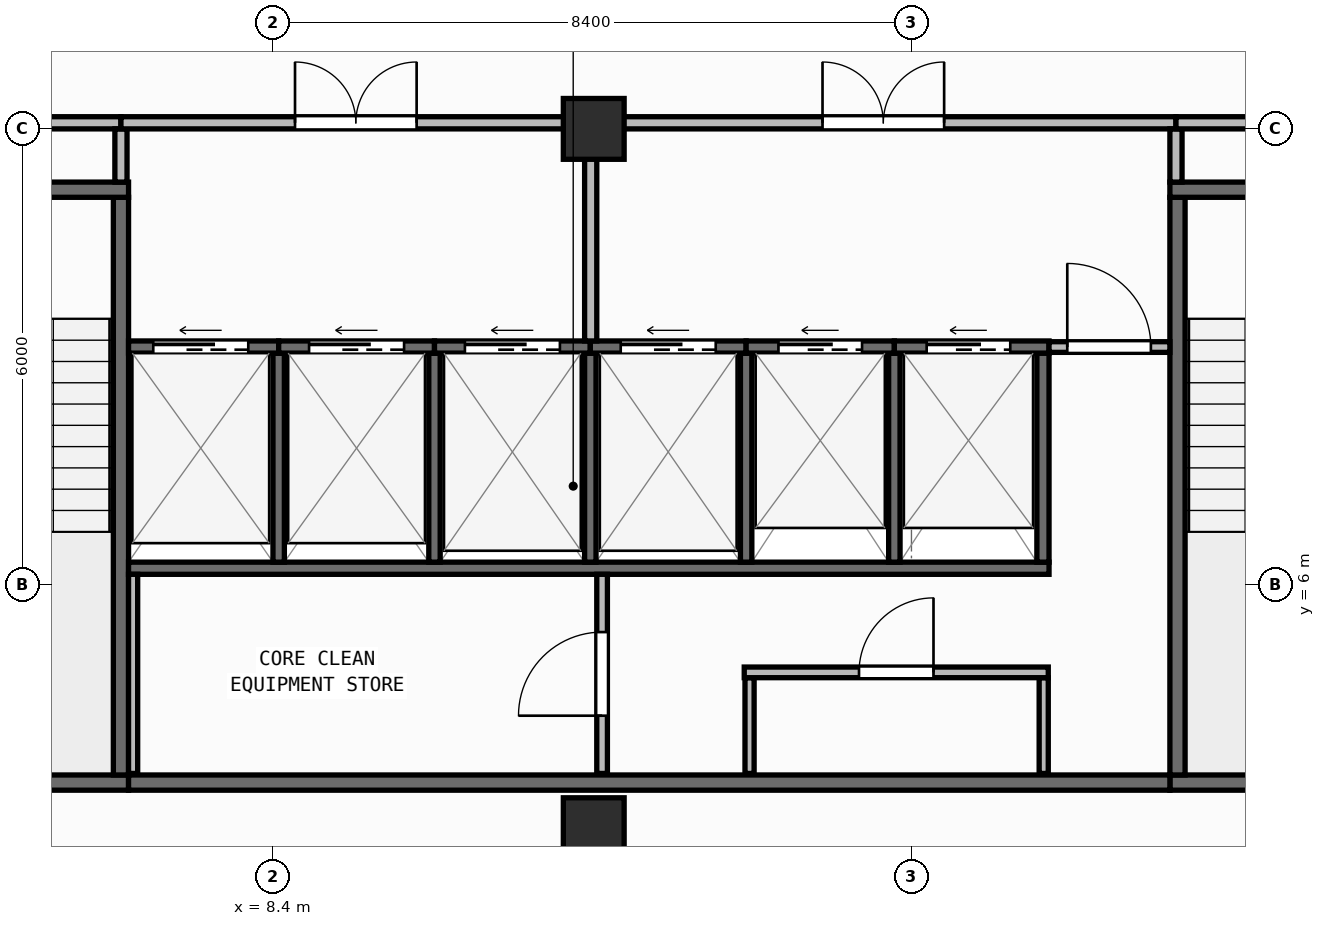
"""IFC4 building model, lengths in metres.
Left out: names, types, materials, properties, quantities, classifications, styles, units other than length and angle.
Written with IfcOpenShell. Run it as: python <this file> out.ifc"""

import sys

from ifc_helpers import new_model, si_unit, direction, frame, frame_2d, origin, origin_2d, place, context, subcontext, project, spatial, rectangle, extrude, element, fill, save


model = new_model("IFC4")
c1 = context("Model", 3, precision=1e-05, world=origin(), true_north=direction((0.0, 1.0)))
c2 = subcontext(c1, "Body", "Model", "MODEL_VIEW")
j1 = project(units=[si_unit("LENGTHUNIT", "METRE"), si_unit("PLANEANGLEUNIT", "RADIAN")], contexts=[c1])
p1 = place(None, origin())
s1 = spatial("IfcSite", under=j1, at=p1, CompositionType="ELEMENT")
p2 = place(p1, origin())
s2 = spatial("IfcBuilding", under=s1, at=p2, CompositionType="ELEMENT")
p3 = place(p2, frame((0.0, 0.0, 300.0)))
s3 = spatial("IfcBuildingStorey", under=s2, at=p3, CompositionType="ELEMENT", Elevation=300.0)
for number, where, z_axis, x_axis in (
    (1, (12.62, 2.8, 0.0), (0.0, 0.0, 1.0), (1.0, 0.0, 0.0)),
    (2, (12.62, 12.0, 0.0), (0.0, 0.0, 1.0), (1.0, 0.0, 0.0)),
):
    element("IfcColumn", number, at=place(p3, frame(where, z_axis=z_axis, x_axis=x_axis)), inside=s3, PredefinedType="COLUMN", context=c2, shape_type="SweptSolid", body=[
        extrude(rectangle(XDim=0.8, YDim=0.8, at=origin_2d()), origin(), (0.0, 0.0, 1.0), 3.95),
    ])
p4 = place(p3, frame((2.46, 0.171, 0.0), z_axis=(0.0, 0.0, 1.0), x_axis=(0.997760665813, 0.066885377746, 0.0)))
e3 = element("IfcWall", 3, at=p4, inside=s3, PredefinedType="STANDARD", context=c2, shape_type="SweptSolid", body=[
    extrude(rectangle(XDim=35.56, YDim=0.26, at=frame_2d((17.78, 0.0))), origin(), (0.0, 0.0, 1.0), 3.67),
])
p5 = place(p4, frame((16.58, 0.0, 0.9)))
e4 = element("IfcOpeningElement", 4, at=p5, cuts=e3, PredefinedType="OPENING", context=c2, shape_type="SweptSolid", body=[
    extrude(rectangle(XDim=2.4, YDim=1.65, at=frame_2d((1.2, 0.825))), frame((0.0, 0.14, 0.0), z_axis=(0.0, -1.0, 0.0), x_axis=(1.0, 0.0, 0.0)), (0.0, 0.0, 1.0), 0.28),
])
p6 = place(p3, frame((2.8, 3.4, 0.0), z_axis=(0.0, 0.0, 1.0), x_axis=(1.0, 0.0, 0.0)))
e5 = element("IfcWall", 5, at=p6, inside=s3, PredefinedType="SHEAR", context=c2, shape_type="SweptSolid", body=[
    extrude(rectangle(XDim=3.7, YDim=0.2, at=frame_2d((1.85, 0.0))), origin(), (0.0, 0.0, 1.0), 3.67),
])
p7 = place(p3, frame((6.4, 3.5, 0.0), z_axis=(0.0, 0.0, 1.0), x_axis=(0.0, 1.0, 0.0)))
e6 = element("IfcWall", 6, at=p7, inside=s3, PredefinedType="SHEAR", context=c2, shape_type="SweptSolid", body=[
    extrude(rectangle(XDim=7.6, YDim=0.2, at=frame_2d((3.8, 0.0))), origin(), (0.0, 0.0, 1.0), 3.67),
])
p8 = place(p3, frame((2.8, 11.2, 0.0), z_axis=(0.0, 0.0, 1.0), x_axis=(1.0, 0.0, 0.0)))
e7 = element("IfcWall", 7, at=p8, inside=s3, PredefinedType="SHEAR", context=c2, shape_type="SweptSolid", body=[
    extrude(rectangle(XDim=3.7, YDim=0.2, at=frame_2d((1.85, 0.0))), origin(), (0.0, 0.0, 1.0), 3.67),
])
p9 = place(p8, frame((1.2, 0.0, 0.0)))
e8 = element("IfcOpeningElement", 8, at=p9, cuts=e7, PredefinedType="OPENING", context=c2, shape_type="SweptSolid", body=[
    extrude(rectangle(XDim=1.3, YDim=2.15, at=frame_2d((0.65, 1.075))), frame((0.0, 0.11, 0.0), z_axis=(0.0, -1.0, 0.0), x_axis=(1.0, 0.0, 0.0)), (0.0, 0.0, 1.0), 0.22),
])
p10 = place(p3, frame((20.2, 3.4, 0.0), z_axis=(0.0, 0.0, 1.0), x_axis=(1.0, 0.0, 0.0)))
e9 = element("IfcWall", 9, at=p10, inside=s3, PredefinedType="SHEAR", context=c2, shape_type="SweptSolid", body=[
    extrude(rectangle(XDim=3.7, YDim=0.2, at=frame_2d((1.85, 0.0))), origin(), (0.0, 0.0, 1.0), 3.67),
])
p11 = place(p3, frame((20.3, 3.5, 0.0), z_axis=(0.0, 0.0, 1.0), x_axis=(0.0, 1.0, 0.0)))
e10 = element("IfcWall", 10, at=p11, inside=s3, PredefinedType="SHEAR", context=c2, shape_type="SweptSolid", body=[
    extrude(rectangle(XDim=7.6, YDim=0.2, at=frame_2d((3.8, 0.0))), origin(), (0.0, 0.0, 1.0), 3.67),
])
p12 = place(p3, frame((20.2, 11.2, 0.0), z_axis=(0.0, 0.0, 1.0), x_axis=(1.0, 0.0, 0.0)))
e11 = element("IfcWall", 11, at=p12, inside=s3, PredefinedType="SHEAR", context=c2, shape_type="SweptSolid", body=[
    extrude(rectangle(XDim=3.7, YDim=0.2, at=frame_2d((1.85, 0.0))), origin(), (0.0, 0.0, 1.0), 3.67),
])
p13 = place(p12, frame((1.2, 0.0, 0.0)))
e12 = element("IfcOpeningElement", 12, at=p13, cuts=e11, PredefinedType="OPENING", context=c2, shape_type="SweptSolid", body=[
    extrude(rectangle(XDim=1.3, YDim=2.15, at=frame_2d((0.65, 1.075))), frame((0.0, 0.11, 0.0), z_axis=(0.0, -1.0, 0.0), x_axis=(1.0, 0.0, 0.0)), (0.0, 0.0, 1.0), 0.22),
])
p14 = place(p3, frame((6.5, 3.4, 0.0), z_axis=(0.0, 0.0, 1.0), x_axis=(1.0, 0.0, 0.0)))
e13 = element("IfcWall", 13, at=p14, inside=s3, PredefinedType="SHEAR", context=c2, shape_type="SweptSolid", body=[
    extrude(rectangle(XDim=13.7, YDim=0.2, at=frame_2d((6.85, 0.0))), origin(), (0.0, 0.0, 1.0), 3.67),
])
p15 = place(p3, frame((6.5, 6.22, 0.0), z_axis=(0.0, 0.0, 1.0), x_axis=(1.0, 0.0, 0.0)))
e14 = element("IfcWall", 14, at=p15, inside=s3, PredefinedType="SHEAR", context=c2, shape_type="SweptSolid", body=[
    extrude(rectangle(XDim=12.11, YDim=0.16, at=frame_2d((6.055, 0.0))), origin(), (0.0, 0.0, 1.0), 3.67),
])
p16 = place(p3, frame((18.53, 6.3, 0.0), z_axis=(0.0, 0.0, 1.0), x_axis=(0.0, 1.0, 0.0)))
e15 = element("IfcWall", 15, at=p16, inside=s3, PredefinedType="SHEAR", context=c2, shape_type="SweptSolid", body=[
    extrude(rectangle(XDim=2.75, YDim=0.16, at=frame_2d((1.375, 0.0))), origin(), (0.0, 0.0, 1.0), 3.67),
])
for number, where, z_axis, x_axis in (
    (16, (8.475, 6.3, 0.0), (0.0, 0.0, 1.0), (0.0, 1.0, 0.0)),
    (17, (10.525, 6.3, 0.0), (0.0, 0.0, 1.0), (0.0, 1.0, 0.0)),
    (18, (12.575, 6.3, 0.0), (0.0, 0.0, 1.0), (0.0, 1.0, 0.0)),
    (19, (14.625, 6.3, 0.0), (0.0, 0.0, 1.0), (0.0, 1.0, 0.0)),
    (20, (16.575, 6.3, 0.0), (0.0, 0.0, 1.0), (0.0, 1.0, 0.0)),
):
    element("IfcWall", number, at=place(p3, frame(where, z_axis=z_axis, x_axis=x_axis)), inside=s3, PredefinedType="SHEAR", context=c2, shape_type="SweptSolid", body=[
        extrude(rectangle(XDim=2.75, YDim=0.15, at=frame_2d((1.375, 0.0))), origin(), (0.0, 0.0, 1.0), 3.67),
    ])
p17 = place(p3, frame((6.5, 9.13, 0.0), z_axis=(0.0, 0.0, 1.0), x_axis=(1.0, 0.0, 0.0)))
e21 = element("IfcWall", 21, at=p17, inside=s3, PredefinedType="SHEAR", context=c2, shape_type="SweptSolid", body=[
    extrude(rectangle(XDim=1.975, YDim=0.16, at=frame_2d((0.988, 0.0))), origin(), (0.0, 0.0, 1.0), 3.67),
])
p18 = place(p17, frame((0.325, 0.0, 0.0)))
e22 = element("IfcOpeningElement", 22, at=p18, cuts=e21, PredefinedType="OPENING", context=c2, shape_type="SweptSolid", body=[
    extrude(rectangle(XDim=1.25, YDim=2.15, at=frame_2d((0.625, 1.075))), frame((0.0, 0.09, 0.0), z_axis=(0.0, -1.0, 0.0), x_axis=(1.0, 0.0, 0.0)), (0.0, 0.0, 1.0), 0.18),
])
p19 = place(p3, frame((8.475, 9.13, 0.0), z_axis=(0.0, 0.0, 1.0), x_axis=(1.0, 0.0, 0.0)))
e23 = element("IfcWall", 23, at=p19, inside=s3, PredefinedType="SHEAR", context=c2, shape_type="SweptSolid", body=[
    extrude(rectangle(XDim=2.05, YDim=0.16, at=frame_2d((1.025, 0.0))), origin(), (0.0, 0.0, 1.0), 3.67),
])
p20 = place(p19, frame((0.4, 0.0, 0.0)))
e24 = element("IfcOpeningElement", 24, at=p20, cuts=e23, PredefinedType="OPENING", context=c2, shape_type="SweptSolid", body=[
    extrude(rectangle(XDim=1.25, YDim=2.15, at=frame_2d((0.625, 1.075))), frame((0.0, 0.09, 0.0), z_axis=(0.0, -1.0, 0.0), x_axis=(1.0, 0.0, 0.0)), (0.0, 0.0, 1.0), 0.18),
])
p21 = place(p3, frame((10.525, 9.13, 0.0), z_axis=(0.0, 0.0, 1.0), x_axis=(1.0, 0.0, 0.0)))
e25 = element("IfcWall", 25, at=p21, inside=s3, PredefinedType="SHEAR", context=c2, shape_type="SweptSolid", body=[
    extrude(rectangle(XDim=2.05, YDim=0.16, at=frame_2d((1.025, 0.0))), origin(), (0.0, 0.0, 1.0), 3.67),
])
p22 = place(p21, frame((0.4, 0.0, 0.0)))
e26 = element("IfcOpeningElement", 26, at=p22, cuts=e25, PredefinedType="OPENING", context=c2, shape_type="SweptSolid", body=[
    extrude(rectangle(XDim=1.25, YDim=2.15, at=frame_2d((0.625, 1.075))), frame((0.0, 0.09, 0.0), z_axis=(0.0, -1.0, 0.0), x_axis=(1.0, 0.0, 0.0)), (0.0, 0.0, 1.0), 0.18),
])
p23 = place(p3, frame((12.575, 9.13, 0.0), z_axis=(0.0, 0.0, 1.0), x_axis=(1.0, 0.0, 0.0)))
e27 = element("IfcWall", 27, at=p23, inside=s3, PredefinedType="SHEAR", context=c2, shape_type="SweptSolid", body=[
    extrude(rectangle(XDim=2.05, YDim=0.16, at=frame_2d((1.025, 0.0))), origin(), (0.0, 0.0, 1.0), 3.67),
])
p24 = place(p23, frame((0.4, 0.0, 0.0)))
e28 = element("IfcOpeningElement", 28, at=p24, cuts=e27, PredefinedType="OPENING", context=c2, shape_type="SweptSolid", body=[
    extrude(rectangle(XDim=1.25, YDim=2.15, at=frame_2d((0.625, 1.075))), frame((0.0, 0.09, 0.0), z_axis=(0.0, -1.0, 0.0), x_axis=(1.0, 0.0, 0.0)), (0.0, 0.0, 1.0), 0.18),
])
p25 = place(p3, frame((14.625, 9.13, 0.0), z_axis=(0.0, 0.0, 1.0), x_axis=(1.0, 0.0, 0.0)))
e29 = element("IfcWall", 29, at=p25, inside=s3, PredefinedType="SHEAR", context=c2, shape_type="SweptSolid", body=[
    extrude(rectangle(XDim=1.95, YDim=0.16, at=frame_2d((0.975, 0.0))), origin(), (0.0, 0.0, 1.0), 3.67),
])
p26 = place(p25, frame((0.425, 0.0, 0.0)))
e30 = element("IfcOpeningElement", 30, at=p26, cuts=e29, PredefinedType="OPENING", context=c2, shape_type="SweptSolid", body=[
    extrude(rectangle(XDim=1.1, YDim=2.15, at=frame_2d((0.55, 1.075))), frame((0.0, 0.09, 0.0), z_axis=(0.0, -1.0, 0.0), x_axis=(1.0, 0.0, 0.0)), (0.0, 0.0, 1.0), 0.18),
])
p27 = place(p3, frame((16.575, 9.13, 0.0), z_axis=(0.0, 0.0, 1.0), x_axis=(1.0, 0.0, 0.0)))
e31 = element("IfcWall", 31, at=p27, inside=s3, PredefinedType="SHEAR", context=c2, shape_type="SweptSolid", body=[
    extrude(rectangle(XDim=2.035, YDim=0.16, at=frame_2d((1.018, 0.0))), origin(), (0.0, 0.0, 1.0), 3.67),
])
p28 = place(p27, frame((0.425, 0.0, 0.0)))
e32 = element("IfcOpeningElement", 32, at=p28, cuts=e31, PredefinedType="OPENING", context=c2, shape_type="SweptSolid", body=[
    extrude(rectangle(XDim=1.1, YDim=2.15, at=frame_2d((0.55, 1.075))), frame((0.0, 0.09, 0.0), z_axis=(0.0, -1.0, 0.0), x_axis=(1.0, 0.0, 0.0)), (0.0, 0.0, 1.0), 0.18),
])
p29 = place(p3, frame((6.56, 3.52, 0.0), z_axis=(0.0, 0.0, 1.0), x_axis=(0.0, 1.0, 0.0)))
e33 = element("IfcWall", 33, at=p29, inside=s3, PredefinedType="PARTITIONING", context=c2, shape_type="SweptSolid", body=[
    extrude(rectangle(XDim=2.62, YDim=0.12, at=frame_2d((1.31, 0.0))), origin(), (0.0, 0.0, 1.0), 3.67),
])
p30 = place(p3, frame((12.73, 3.52, 0.0), z_axis=(0.0, 0.0, 1.0), x_axis=(0.0, 1.0, 0.0)))
e34 = element("IfcWall", 34, at=p30, inside=s3, PredefinedType="PARTITIONING", context=c2, shape_type="SweptSolid", body=[
    extrude(rectangle(XDim=2.62, YDim=0.14, at=frame_2d((1.31, 0.0))), origin(), (0.0, 0.0, 1.0), 3.67),
])
p31 = place(p30, frame((0.76, 0.0, 0.0)))
e35 = element("IfcOpeningElement", 35, at=p31, cuts=e34, PredefinedType="OPENING", context=c2, shape_type="SweptSolid", body=[
    extrude(rectangle(XDim=1.1, YDim=2.1, at=frame_2d((0.55, 1.05))), frame((0.0, 0.08, 0.0), z_axis=(0.0, -1.0, 0.0), x_axis=(1.0, 0.0, 0.0)), (0.0, 0.0, 1.0), 0.16),
])
for number, where, z_axis, x_axis in (
    (36, (14.67, 3.52, 0.0), (0.0, 0.0, 1.0), (0.0, 1.0, 0.0)),
    (37, (18.54, 3.52, 0.0), (0.0, 0.0, 1.0), (0.0, 1.0, 0.0)),
):
    element("IfcWall", number, at=place(p3, frame(where, z_axis=z_axis, x_axis=x_axis)), inside=s3, PredefinedType="PARTITIONING", context=c2, shape_type="SweptSolid", body=[
        extrude(rectangle(XDim=1.26, YDim=0.12, at=frame_2d((0.63, 0.0))), origin(), (0.0, 0.0, 1.0), 3.67),
    ])
p32 = place(p3, frame((14.6, 4.85, 0.0), z_axis=(0.0, 0.0, 1.0), x_axis=(1.0, 0.0, 0.0)))
e38 = element("IfcWall", 38, at=p32, inside=s3, PredefinedType="PARTITIONING", context=c2, shape_type="SweptSolid", body=[
    extrude(rectangle(XDim=4.0, YDim=0.14, at=frame_2d((2.0, 0.0))), origin(), (0.0, 0.0, 1.0), 3.67),
])
p33 = place(p32, frame((1.51, 0.0, 0.0)))
e39 = element("IfcOpeningElement", 39, at=p33, cuts=e38, PredefinedType="OPENING", context=c2, shape_type="SweptSolid", body=[
    extrude(rectangle(XDim=0.98, YDim=2.1, at=frame_2d((0.49, 1.05))), frame((0.0, 0.08, 0.0), z_axis=(0.0, -1.0, 0.0), x_axis=(1.0, 0.0, 0.0)), (0.0, 0.0, 1.0), 0.16),
])
p34 = place(p3, frame((18.61, 9.13, 0.0), z_axis=(0.0, 0.0, 1.0), x_axis=(1.0, 0.0, 0.0)))
e40 = element("IfcWall", 40, at=p34, inside=s3, PredefinedType="PARTITIONING", context=c2, shape_type="SweptSolid", body=[
    extrude(rectangle(XDim=1.59, YDim=0.14, at=frame_2d((0.795, 0.0))), origin(), (0.0, 0.0, 1.0), 3.67),
])
p35 = place(p34, frame((0.24, 0.0, 0.0)))
e41 = element("IfcOpeningElement", 41, at=p35, cuts=e40, PredefinedType="OPENING", context=c2, shape_type="SweptSolid", body=[
    extrude(rectangle(XDim=1.1, YDim=2.1, at=frame_2d((0.55, 1.05))), frame((0.0, 0.08, 0.0), z_axis=(0.0, -1.0, 0.0), x_axis=(1.0, 0.0, 0.0)), (0.0, 0.0, 1.0), 0.16),
])
p36 = place(p3, frame((2.8, 12.08, 0.0), z_axis=(0.0, 0.0, 1.0), x_axis=(1.0, 0.0, 0.0)))
e42 = element("IfcWall", 42, at=p36, inside=s3, PredefinedType="PARTITIONING", context=c2, shape_type="SweptSolid", body=[
    extrude(rectangle(XDim=3.6, YDim=0.16, at=frame_2d((1.8, 0.0))), origin(), (0.0, 0.0, 1.0), 3.117),
])
p37 = place(p36, frame((1.0, 0.0, 0.0)))
e43 = element("IfcOpeningElement", 43, at=p37, cuts=e42, PredefinedType="OPENING", context=c2, shape_type="SweptSolid", body=[
    extrude(rectangle(XDim=1.6, YDim=2.05, at=frame_2d((0.8, 1.025))), frame((0.0, 0.09, 0.0), z_axis=(0.0, -1.0, 0.0), x_axis=(1.0, 0.0, 0.0)), (0.0, 0.0, 1.0), 0.18),
])
p38 = place(p3, frame((6.4, 11.3, 0.0), z_axis=(0.0, 0.0, 1.0), x_axis=(0.0, 1.0, 0.0)))
e44 = element("IfcWall", 44, at=p38, inside=s3, PredefinedType="PARTITIONING", context=c2, shape_type="SweptSolid", body=[
    extrude(rectangle(XDim=0.7, YDim=0.16, at=frame_2d((0.35, 0.0))), origin(), (0.0, 0.0, 1.0), 3.67),
])
p39 = place(p3, frame((6.4, 12.08, 0.0), z_axis=(0.0, 0.0, 1.0), x_axis=(1.0, 0.0, 0.0)))
e45 = element("IfcWall", 45, at=p39, inside=s3, PredefinedType="PARTITIONING", context=c2, shape_type="SweptSolid", body=[
    extrude(rectangle(XDim=6.18, YDim=0.16, at=frame_2d((3.09, 0.0))), origin(), (0.0, 0.0, 1.0), 3.117),
])
p40 = place(p39, frame((2.29, 0.0, 0.0)))
e46 = element("IfcOpeningElement", 46, at=p40, cuts=e45, PredefinedType="OPENING", context=c2, shape_type="SweptSolid", body=[
    extrude(rectangle(XDim=1.6, YDim=2.05, at=frame_2d((0.8, 1.025))), frame((0.0, 0.09, 0.0), z_axis=(0.0, -1.0, 0.0), x_axis=(1.0, 0.0, 0.0)), (0.0, 0.0, 1.0), 0.18),
])
p41 = place(p3, frame((12.58, 9.21, 0.0), z_axis=(0.0, 0.0, 1.0), x_axis=(0.0, 1.0, 0.0)))
e47 = element("IfcWall", 47, at=p41, inside=s3, PredefinedType="PARTITIONING", context=c2, shape_type="SweptSolid", body=[
    extrude(rectangle(XDim=2.79, YDim=0.16, at=frame_2d((1.395, 0.0))), origin(), (0.0, 0.0, 1.0), 3.67),
])
p42 = place(p3, frame((12.58, 12.08, 0.0), z_axis=(0.0, 0.0, 1.0), x_axis=(1.0, 0.0, 0.0)))
e48 = element("IfcWall", 48, at=p42, inside=s3, PredefinedType="PARTITIONING", context=c2, shape_type="SweptSolid", body=[
    extrude(rectangle(XDim=7.7, YDim=0.16, at=frame_2d((3.85, 0.0))), origin(), (0.0, 0.0, 1.0), 3.117),
])
p43 = place(p42, frame((3.05, 0.0, 0.0)))
e49 = element("IfcOpeningElement", 49, at=p43, cuts=e48, PredefinedType="OPENING", context=c2, shape_type="SweptSolid", body=[
    extrude(rectangle(XDim=1.6, YDim=2.05, at=frame_2d((0.8, 1.025))), frame((0.0, 0.09, 0.0), z_axis=(0.0, -1.0, 0.0), x_axis=(1.0, 0.0, 0.0)), (0.0, 0.0, 1.0), 0.18),
])
p44 = place(p3, frame((20.28, 11.3, 0.0), z_axis=(0.0, 0.0, 1.0), x_axis=(0.0, 1.0, 0.0)))
e50 = element("IfcWall", 50, at=p44, inside=s3, PredefinedType="PARTITIONING", context=c2, shape_type="SweptSolid", body=[
    extrude(rectangle(XDim=0.7, YDim=0.16, at=frame_2d((0.35, 0.0))), origin(), (0.0, 0.0, 1.0), 3.67),
])
p45 = place(p3, frame((20.28, 12.08, 0.0), z_axis=(0.0, 0.0, 1.0), x_axis=(1.0, 0.0, 0.0)))
e51 = element("IfcWall", 51, at=p45, inside=s3, PredefinedType="PARTITIONING", context=c2, shape_type="SweptSolid", body=[
    extrude(rectangle(XDim=3.62, YDim=0.16, at=frame_2d((1.81, 0.0))), origin(), (0.0, 0.0, 1.0), 3.117),
])
p46 = place(p45, frame((1.01, 0.0, 0.0)))
e52 = element("IfcOpeningElement", 52, at=p46, cuts=e51, PredefinedType="OPENING", context=c2, shape_type="SweptSolid", body=[
    extrude(rectangle(XDim=1.6, YDim=2.05, at=frame_2d((0.8, 1.025))), frame((0.0, 0.09, 0.0), z_axis=(0.0, -1.0, 0.0), x_axis=(1.0, 0.0, 0.0)), (0.0, 0.0, 1.0), 0.18),
])
p47 = place(p18, origin())
e53 = element("IfcDoor", 53, at=p47, inside=s3, OperationType="SLIDING_TO_LEFT", PredefinedType="DOOR", context=c2, shape_type="SweptSolid", body=[
    extrude(rectangle(XDim=1.25, YDim=2.15, at=frame_2d((0.625, 1.075))), frame((0.0, 0.025, 0.0), z_axis=(0.0, -1.0, 0.0), x_axis=(1.0, 0.0, 0.0)), (0.0, 0.0, 1.0), 0.05),
])
fill(e22, e53)
p48 = place(p20, origin())
e54 = element("IfcDoor", 54, at=p48, inside=s3, OperationType="SLIDING_TO_LEFT", PredefinedType="DOOR", context=c2, shape_type="SweptSolid", body=[
    extrude(rectangle(XDim=1.25, YDim=2.15, at=frame_2d((0.625, 1.075))), frame((0.0, 0.025, 0.0), z_axis=(0.0, -1.0, 0.0), x_axis=(1.0, 0.0, 0.0)), (0.0, 0.0, 1.0), 0.05),
])
fill(e24, e54)
p49 = place(p22, origin())
e55 = element("IfcDoor", 55, at=p49, inside=s3, OperationType="SLIDING_TO_LEFT", PredefinedType="DOOR", context=c2, shape_type="SweptSolid", body=[
    extrude(rectangle(XDim=1.25, YDim=2.15, at=frame_2d((0.625, 1.075))), frame((0.0, 0.025, 0.0), z_axis=(0.0, -1.0, 0.0), x_axis=(1.0, 0.0, 0.0)), (0.0, 0.0, 1.0), 0.05),
])
fill(e26, e55)
p50 = place(p24, origin())
e56 = element("IfcDoor", 56, at=p50, inside=s3, OperationType="SLIDING_TO_LEFT", PredefinedType="DOOR", context=c2, shape_type="SweptSolid", body=[
    extrude(rectangle(XDim=1.25, YDim=2.15, at=frame_2d((0.625, 1.075))), frame((0.0, 0.025, 0.0), z_axis=(0.0, -1.0, 0.0), x_axis=(1.0, 0.0, 0.0)), (0.0, 0.0, 1.0), 0.05),
])
fill(e28, e56)
p51 = place(p26, origin())
e57 = element("IfcDoor", 57, at=p51, inside=s3, OperationType="SLIDING_TO_LEFT", PredefinedType="DOOR", context=c2, shape_type="SweptSolid", body=[
    extrude(rectangle(XDim=1.1, YDim=2.15, at=frame_2d((0.55, 1.075))), frame((0.0, 0.025, 0.0), z_axis=(0.0, -1.0, 0.0), x_axis=(1.0, 0.0, 0.0)), (0.0, 0.0, 1.0), 0.05),
])
fill(e30, e57)
p52 = place(p28, origin())
e58 = element("IfcDoor", 58, at=p52, inside=s3, OperationType="SLIDING_TO_LEFT", PredefinedType="DOOR", context=c2, shape_type="SweptSolid", body=[
    extrude(rectangle(XDim=1.1, YDim=2.15, at=frame_2d((0.55, 1.075))), frame((0.0, 0.025, 0.0), z_axis=(0.0, -1.0, 0.0), x_axis=(1.0, 0.0, 0.0)), (0.0, 0.0, 1.0), 0.05),
])
fill(e32, e58)
p53 = place(p31, origin())
e59 = element("IfcDoor", 59, at=p53, inside=s3, OperationType="SINGLE_SWING_LEFT", PredefinedType="DOOR", context=c2, shape_type="SweptSolid", body=[
    extrude(rectangle(XDim=1.1, YDim=2.1, at=frame_2d((0.55, 1.05))), frame((0.0, 0.025, 0.0), z_axis=(0.0, -1.0, 0.0), x_axis=(1.0, 0.0, 0.0)), (0.0, 0.0, 1.0), 0.05),
])
fill(e35, e59)
p54 = place(p33, origin())
e60 = element("IfcDoor", 60, at=p54, inside=s3, OperationType="SINGLE_SWING_RIGHT", PredefinedType="DOOR", context=c2, shape_type="SweptSolid", body=[
    extrude(rectangle(XDim=0.98, YDim=2.1, at=frame_2d((0.49, 1.05))), frame((0.0, 0.025, 0.0), z_axis=(0.0, -1.0, 0.0), x_axis=(1.0, 0.0, 0.0)), (0.0, 0.0, 1.0), 0.05),
])
fill(e39, e60)
p55 = place(p35, origin())
e61 = element("IfcDoor", 61, at=p55, inside=s3, OperationType="SINGLE_SWING_LEFT", PredefinedType="DOOR", context=c2, shape_type="SweptSolid", body=[
    extrude(rectangle(XDim=1.1, YDim=2.1, at=frame_2d((0.55, 1.05))), frame((0.0, 0.025, 0.0), z_axis=(0.0, -1.0, 0.0), x_axis=(1.0, 0.0, 0.0)), (0.0, 0.0, 1.0), 0.05),
])
fill(e41, e61)
p56 = place(p40, origin())
e62 = element("IfcDoor", 62, at=p56, inside=s3, OperationType="DOUBLE_DOOR_SINGLE_SWING", PredefinedType="DOOR", context=c2, shape_type="SweptSolid", body=[
    extrude(rectangle(XDim=1.6, YDim=2.05, at=frame_2d((0.8, 1.025))), frame((0.0, 0.025, 0.0), z_axis=(0.0, -1.0, 0.0), x_axis=(1.0, 0.0, 0.0)), (0.0, 0.0, 1.0), 0.05),
])
fill(e46, e62)
p57 = place(p43, origin())
e63 = element("IfcDoor", 63, at=p57, inside=s3, OperationType="DOUBLE_DOOR_SINGLE_SWING", PredefinedType="DOOR", context=c2, shape_type="SweptSolid", body=[
    extrude(rectangle(XDim=1.6, YDim=2.05, at=frame_2d((0.8, 1.025))), frame((0.0, 0.025, 0.0), z_axis=(0.0, -1.0, 0.0), x_axis=(1.0, 0.0, 0.0)), (0.0, 0.0, 1.0), 0.05),
])
fill(e49, e63)
save(model, sys.argv[1])
